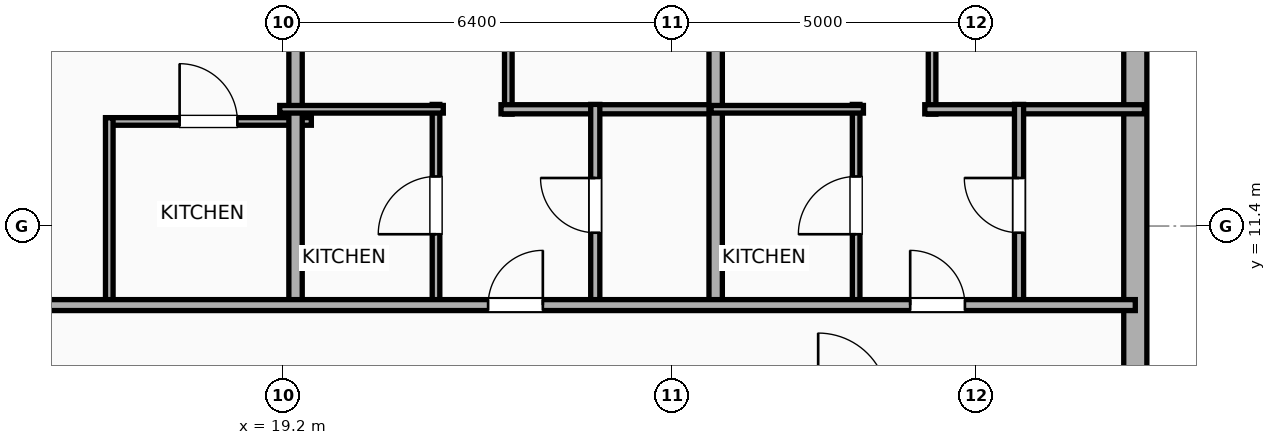
"""IFC4 building model, lengths in metres.
Left out: names, types, materials, properties, quantities, classifications, styles, units other than length and angle.
Written with IfcOpenShell. Run it as: python <this file> out.ifc"""

import sys

from ifc_helpers import new_model, si_unit, direction, frame, frame_2d, origin, place, context, subcontext, project, spatial, rectangle, extrude, element, fill, save


model = new_model("IFC4")
c1 = context("Model", 3, precision=1e-05, world=origin(), true_north=direction((0.0, 1.0)))
c2 = subcontext(c1, "Body", "Model", "MODEL_VIEW")
j1 = project(units=[si_unit("LENGTHUNIT", "METRE"), si_unit("PLANEANGLEUNIT", "RADIAN")], contexts=[c1])
p1 = place(None, origin())
s1 = spatial("IfcSite", under=j1, at=p1, CompositionType="ELEMENT")
p2 = place(p1, origin())
s2 = spatial("IfcBuilding", under=s1, at=p2, CompositionType="ELEMENT")
p3 = place(p2, frame((0.0, 0.0, 97.5)))
s3 = spatial("IfcBuildingStorey", under=s2, at=p3, CompositionType="ELEMENT", Elevation=97.5)
p4 = place(p3, frame((33.21, 17.781, 0.0), z_axis=(0.0, 0.0, 1.0), x_axis=(0.0, -1.0, 0.0)))
e1 = element("IfcWall", 1, at=p4, inside=s3, PredefinedType="ELEMENTEDWALL", context=c2, shape_type="SweptSolid", body=[
    extrude(rectangle(XDim=34.363, YDim=0.38, at=frame_2d((17.181, 0.0))), origin(), (0.0, 0.0, 1.0), 3.65),
])
p5 = place(p4, frame((12.836, 0.0, 0.75)))
e2 = element("IfcOpeningElement", 2, at=p5, cuts=e1, PredefinedType="OPENING", context=c2, shape_type="SweptSolid", body=[
    extrude(rectangle(XDim=1.2, YDim=2.05, at=frame_2d((0.6, 1.025))), frame((0.0, 0.2, 0.0), z_axis=(0.0, -1.0, 0.0), x_axis=(1.0, 0.0, 0.0)), (0.0, 0.0, 1.0), 0.4),
])
p6 = place(p4, frame((21.386, 0.0, 0.75)))
e3 = element("IfcOpeningElement", 3, at=p6, cuts=e1, PredefinedType="OPENING", context=c2, shape_type="SweptSolid", body=[
    extrude(rectangle(XDim=1.2, YDim=2.05, at=frame_2d((0.6, 1.025))), frame((0.0, 0.2, 0.0), z_axis=(0.0, -1.0, 0.0), x_axis=(1.0, 0.0, 0.0)), (0.0, 0.0, 1.0), 0.4),
])
p7 = place(p3, frame((16.277, 13.12, 0.0), z_axis=(0.0, 0.0, 1.0), x_axis=(1.0, 0.0, 0.0)))
e4 = element("IfcWall", 4, at=p7, inside=s3, PredefinedType="PARTITIONING", context=c2, shape_type="SweptSolid", body=[
    extrude(rectangle(XDim=3.383, YDim=0.125, at=frame_2d((1.691, 0.0))), origin(), (0.0, 0.0, 1.0), 3.65),
])
p8 = place(p7, frame((1.217, 0.0, 0.0)))
e5 = element("IfcOpeningElement", 5, at=p8, cuts=e4, PredefinedType="OPENING", context=c2, shape_type="SweptSolid", body=[
    extrude(rectangle(XDim=0.95, YDim=2.05, at=frame_2d((0.475, 1.025))), frame((0.0, 0.073, 0.0), z_axis=(0.0, -1.0, 0.0), x_axis=(1.0, 0.0, 0.0)), (0.0, 0.0, 1.0), 0.145),
])
p9 = place(p3, frame((16.337, 10.08, 0.0), z_axis=(0.0, 0.0, 1.0), x_axis=(0.0, 1.0, 0.0)))
e6 = element("IfcWall", 6, at=p9, inside=s3, PredefinedType="PARTITIONING", context=c2, shape_type="SweptSolid", body=[
    extrude(rectangle(XDim=3.1, YDim=0.125, at=frame_2d((1.55, 0.0))), origin(), (0.0, 0.0, 1.0), 3.65),
])
p10 = place(p3, frame((19.4, 10.02, 0.0), z_axis=(0.0, 0.0, 1.0), x_axis=(0.0, 1.0, 0.0)))
e7 = element("IfcWall", 7, at=p10, inside=s3, PredefinedType="PARTITIONING", context=c2, shape_type="SweptSolid", body=[
    extrude(rectangle(XDim=11.59, YDim=0.22, at=frame_2d((5.795, 0.0))), origin(), (0.0, 0.0, 1.0), 3.65),
])
p11 = place(p3, frame((22.899, 13.24, 0.0), z_axis=(0.0, 0.0, 1.0), x_axis=(0.0, 1.0, 0.0)))
e8 = element("IfcWall", 8, at=p11, inside=s3, PredefinedType="PARTITIONING", context=c2, shape_type="SweptSolid", body=[
    extrude(rectangle(XDim=8.52, YDim=0.125, at=frame_2d((4.26, 0.0))), origin(), (0.0, 0.0, 1.0), 3.65),
])
p12 = place(p11, frame((1.595, 0.0, 0.0)))
e9 = element("IfcOpeningElement", 9, at=p12, cuts=e8, PredefinedType="OPENING", context=c2, shape_type="SweptSolid", body=[
    extrude(rectangle(XDim=0.9, YDim=2.05, at=frame_2d((0.45, 1.025))), frame((0.0, 0.073, 0.0), z_axis=(0.0, -1.0, 0.0), x_axis=(1.0, 0.0, 0.0)), (0.0, 0.0, 1.0), 0.145),
])
p13 = place(p3, frame((22.779, 13.32, 0.0), z_axis=(0.0, 0.0, 1.0), x_axis=(1.0, 0.0, 0.0)))
e10 = element("IfcWall", 10, at=p13, inside=s3, PredefinedType="PLUMBINGWALL", context=c2, shape_type="SweptSolid", body=[
    extrude(rectangle(XDim=3.605, YDim=0.15, at=frame_2d((1.802, 0.0))), origin(), (0.0, 0.0, 1.0), 3.65),
])
p14 = place(p3, frame((21.71, 10.08, 0.0), z_axis=(0.0, 0.0, 1.0), x_axis=(0.0, 1.0, 0.0)))
e11 = element("IfcWall", 11, at=p14, inside=s3, PredefinedType="PARTITIONING", context=c2, shape_type="SweptSolid", body=[
    extrude(rectangle(XDim=3.32, YDim=0.125, at=frame_2d((1.66, 0.0))), origin(), (0.0, 0.0, 1.0), 3.65),
])
p15 = place(p14, frame((1.185, 0.0, 0.0)))
e12 = element("IfcOpeningElement", 12, at=p15, cuts=e11, PredefinedType="OPENING", context=c2, shape_type="SweptSolid", body=[
    extrude(rectangle(XDim=0.95, YDim=2.05, at=frame_2d((0.475, 1.025))), frame((0.0, 0.073, 0.0), z_axis=(0.0, -1.0, 0.0), x_axis=(1.0, 0.0, 0.0)), (0.0, 0.0, 1.0), 0.145),
])
p16 = place(p3, frame((19.14, 13.32, 0.0), z_axis=(0.0, 0.0, 1.0), x_axis=(1.0, 0.0, 0.0)))
e13 = element("IfcWall", 13, at=p16, inside=s3, PredefinedType="PARTITIONING", context=c2, shape_type="SweptSolid", body=[
    extrude(rectangle(XDim=2.69, YDim=0.125, at=frame_2d((1.345, 0.0))), origin(), (0.0, 0.0, 1.0), 3.65),
])
p17 = place(p3, frame((24.329, 10.08, 0.0), z_axis=(0.0, 0.0, 1.0), x_axis=(0.0, 1.0, 0.0)))
e14 = element("IfcWall", 14, at=p17, inside=s3, PredefinedType="PLUMBINGWALL", context=c2, shape_type="SweptSolid", body=[
    extrude(rectangle(XDim=3.32, YDim=0.15, at=frame_2d((1.66, 0.0))), origin(), (0.0, 0.0, 1.0), 3.65),
])
p18 = place(p17, frame((1.21, 0.0, 0.0)))
e15 = element("IfcOpeningElement", 15, at=p18, cuts=e14, PredefinedType="OPENING", context=c2, shape_type="SweptSolid", body=[
    extrude(rectangle(XDim=0.9, YDim=2.05, at=frame_2d((0.45, 1.025))), frame((0.0, 0.085, 0.0), z_axis=(0.0, -1.0, 0.0), x_axis=(1.0, 0.0, 0.0)), (0.0, 0.0, 1.0), 0.17),
])
p19 = place(p3, frame((26.309, 10.02, 0.0), z_axis=(0.0, 0.0, 1.0), x_axis=(0.0, 1.0, 0.0)))
e16 = element("IfcWall", 16, at=p19, inside=s3, PredefinedType="PARTITIONING", context=c2, shape_type="SweptSolid", body=[
    extrude(rectangle(XDim=11.59, YDim=0.22, at=frame_2d((5.795, 0.0))), origin(), (0.0, 0.0, 1.0), 3.65),
])
p20 = place(p3, frame((29.868, 13.24, 0.0), z_axis=(0.0, 0.0, 1.0), x_axis=(0.0, 1.0, 0.0)))
e17 = element("IfcWall", 17, at=p20, inside=s3, PredefinedType="PARTITIONING", context=c2, shape_type="SweptSolid", body=[
    extrude(rectangle(XDim=8.426, YDim=0.125, at=frame_2d((4.213, 0.0))), origin(), (0.0, 0.0, 1.0), 3.65),
])
p21 = place(p20, frame((1.572, 0.0, 0.0)))
e18 = element("IfcOpeningElement", 18, at=p21, cuts=e17, PredefinedType="OPENING", context=c2, shape_type="SweptSolid", body=[
    extrude(rectangle(XDim=0.9, YDim=2.05, at=frame_2d((0.45, 1.025))), frame((0.0, 0.073, 0.0), z_axis=(0.0, -1.0, 0.0), x_axis=(1.0, 0.0, 0.0)), (0.0, 0.0, 1.0), 0.145),
])
p22 = place(p3, frame((29.748, 13.32, 0.0), z_axis=(0.0, 0.0, 1.0), x_axis=(1.0, 0.0, 0.0)))
e19 = element("IfcWall", 19, at=p22, inside=s3, PredefinedType="PLUMBINGWALL", context=c2, shape_type="SweptSolid", body=[
    extrude(rectangle(XDim=3.612, YDim=0.15, at=frame_2d((1.806, 0.0))), origin(), (0.0, 0.0, 1.0), 3.65),
])
p23 = place(p3, frame((28.619, 10.08, 0.0), z_axis=(0.0, 0.0, 1.0), x_axis=(0.0, 1.0, 0.0)))
e20 = element("IfcWall", 20, at=p23, inside=s3, PredefinedType="PARTITIONING", context=c2, shape_type="SweptSolid", body=[
    extrude(rectangle(XDim=3.32, YDim=0.125, at=frame_2d((1.66, 0.0))), origin(), (0.0, 0.0, 1.0), 3.65),
])
p24 = place(p23, frame((1.185, 0.0, 0.0)))
e21 = element("IfcOpeningElement", 21, at=p24, cuts=e20, PredefinedType="OPENING", context=c2, shape_type="SweptSolid", body=[
    extrude(rectangle(XDim=0.95, YDim=2.05, at=frame_2d((0.475, 1.025))), frame((0.0, 0.073, 0.0), z_axis=(0.0, -1.0, 0.0), x_axis=(1.0, 0.0, 0.0)), (0.0, 0.0, 1.0), 0.145),
])
p25 = place(p3, frame((26.234, 13.32, 0.0), z_axis=(0.0, 0.0, 1.0), x_axis=(1.0, 0.0, 0.0)))
e22 = element("IfcWall", 22, at=p25, inside=s3, PredefinedType="PARTITIONING", context=c2, shape_type="SweptSolid", body=[
    extrude(rectangle(XDim=2.505, YDim=0.125, at=frame_2d((1.252, 0.0))), origin(), (0.0, 0.0, 1.0), 3.65),
])
p26 = place(p3, frame((31.298, 10.08, 0.0), z_axis=(0.0, 0.0, 1.0), x_axis=(0.0, 1.0, 0.0)))
e23 = element("IfcWall", 23, at=p26, inside=s3, PredefinedType="PLUMBINGWALL", context=c2, shape_type="SweptSolid", body=[
    extrude(rectangle(XDim=3.32, YDim=0.15, at=frame_2d((1.66, 0.0))), origin(), (0.0, 0.0, 1.0), 3.65),
])
p27 = place(p26, frame((1.21, 0.0, 0.0)))
e24 = element("IfcOpeningElement", 24, at=p27, cuts=e23, PredefinedType="OPENING", context=c2, shape_type="SweptSolid", body=[
    extrude(rectangle(XDim=0.9, YDim=2.05, at=frame_2d((0.45, 1.025))), frame((0.0, 0.085, 0.0), z_axis=(0.0, -1.0, 0.0), x_axis=(1.0, 0.0, 0.0)), (0.0, 0.0, 1.0), 0.17),
])
p28 = place(p3, frame((-29.21, 10.1, 0.0), z_axis=(0.0, 0.0, 1.0), x_axis=(1.0, 0.0, 0.0)))
e25 = element("IfcWall", 25, at=p28, inside=s3, PredefinedType="PARTITIONING", context=c2, shape_type="SweptSolid", body=[
    extrude(rectangle(XDim=62.42, YDim=0.18, at=frame_2d((31.21, 0.0))), origin(), (0.0, 0.0, 1.0), 3.65),
])
p29 = place(p28, frame((4.906, 0.0, 0.0)))
e26 = element("IfcOpeningElement", 26, at=p29, cuts=e25, PredefinedType="OPENING", context=c2, shape_type="SweptSolid", body=[
    extrude(rectangle(XDim=1.15, YDim=2.05, at=frame_2d((0.575, 1.025))), frame((0.0, 0.1, 0.0), z_axis=(0.0, -1.0, 0.0), x_axis=(1.0, 0.0, 0.0)), (0.0, 0.0, 1.0), 0.2),
])
p30 = place(p28, frame((14.812, 0.0, 0.0)))
e27 = element("IfcOpeningElement", 27, at=p30, cuts=e25, PredefinedType="OPENING", context=c2, shape_type="SweptSolid", body=[
    extrude(rectangle(XDim=1.15, YDim=2.05, at=frame_2d((0.575, 1.025))), frame((0.0, 0.1, 0.0), z_axis=(0.0, -1.0, 0.0), x_axis=(1.0, 0.0, 0.0)), (0.0, 0.0, 1.0), 0.2),
])
p31 = place(p28, frame((24.406, 0.0, 0.0)))
e28 = element("IfcOpeningElement", 28, at=p31, cuts=e25, PredefinedType="OPENING", context=c2, shape_type="SweptSolid", body=[
    extrude(rectangle(XDim=1.15, YDim=2.05, at=frame_2d((0.575, 1.025))), frame((0.0, 0.1, 0.0), z_axis=(0.0, -1.0, 0.0), x_axis=(1.0, 0.0, 0.0)), (0.0, 0.0, 1.0), 0.2),
])
p32 = place(p28, frame((33.981, 0.0, 0.0)))
e29 = element("IfcOpeningElement", 29, at=p32, cuts=e25, PredefinedType="OPENING", context=c2, shape_type="SweptSolid", body=[
    extrude(rectangle(XDim=1.15, YDim=2.05, at=frame_2d((0.575, 1.025))), frame((0.0, 0.1, 0.0), z_axis=(0.0, -1.0, 0.0), x_axis=(1.0, 0.0, 0.0)), (0.0, 0.0, 1.0), 0.2),
])
p33 = place(p28, frame((43.138, 0.0, 0.0)))
e30 = element("IfcOpeningElement", 30, at=p33, cuts=e25, PredefinedType="OPENING", context=c2, shape_type="SweptSolid", body=[
    extrude(rectangle(XDim=1.15, YDim=2.05, at=frame_2d((0.575, 1.025))), frame((0.0, 0.1, 0.0), z_axis=(0.0, -1.0, 0.0), x_axis=(1.0, 0.0, 0.0)), (0.0, 0.0, 1.0), 0.2),
])
p34 = place(p28, frame((51.777, 0.0, 0.0)))
e31 = element("IfcOpeningElement", 31, at=p34, cuts=e25, PredefinedType="OPENING", context=c2, shape_type="SweptSolid", body=[
    extrude(rectangle(XDim=0.9, YDim=2.05, at=frame_2d((0.45, 1.025))), frame((0.0, 0.1, 0.0), z_axis=(0.0, -1.0, 0.0), x_axis=(1.0, 0.0, 0.0)), (0.0, 0.0, 1.0), 0.2),
])
p35 = place(p28, frame((58.718, 0.0, 0.0)))
e32 = element("IfcOpeningElement", 32, at=p35, cuts=e25, PredefinedType="OPENING", context=c2, shape_type="SweptSolid", body=[
    extrude(rectangle(XDim=0.9, YDim=2.05, at=frame_2d((0.45, 1.025))), frame((0.0, 0.1, 0.0), z_axis=(0.0, -1.0, 0.0), x_axis=(1.0, 0.0, 0.0)), (0.0, 0.0, 1.0), 0.2),
])
p36 = place(p8, origin())
e33 = element("IfcDoor", 33, at=p36, inside=s3, OperationType="SINGLE_SWING_LEFT", PredefinedType="DOOR", context=c2, shape_type="SweptSolid", body=[
    extrude(rectangle(XDim=0.95, YDim=2.05, at=frame_2d((0.475, 1.025))), frame((0.0, 0.025, 0.0), z_axis=(0.0, -1.0, 0.0), x_axis=(1.0, 0.0, 0.0)), (0.0, 0.0, 1.0), 0.05),
])
fill(e5, e33)
p37 = place(p15, origin())
e34 = element("IfcDoor", 34, at=p37, inside=s3, OperationType="SINGLE_SWING_LEFT", PredefinedType="DOOR", context=c2, shape_type="SweptSolid", body=[
    extrude(rectangle(XDim=0.95, YDim=2.05, at=frame_2d((0.475, 1.025))), frame((0.0, 0.025, 0.0), z_axis=(0.0, -1.0, 0.0), x_axis=(1.0, 0.0, 0.0)), (0.0, 0.0, 1.0), 0.05),
])
fill(e12, e34)
p38 = place(p18, origin())
e35 = element("IfcDoor", 35, at=p38, inside=s3, OperationType="SINGLE_SWING_RIGHT", PredefinedType="DOOR", context=c2, shape_type="SweptSolid", body=[
    extrude(rectangle(XDim=0.9, YDim=2.05, at=frame_2d((0.45, 1.025))), frame((0.0, 0.025, 0.0), z_axis=(0.0, -1.0, 0.0), x_axis=(1.0, 0.0, 0.0)), (0.0, 0.0, 1.0), 0.05),
])
fill(e15, e35)
p39 = place(p24, origin())
e36 = element("IfcDoor", 36, at=p39, inside=s3, OperationType="SINGLE_SWING_LEFT", PredefinedType="DOOR", context=c2, shape_type="SweptSolid", body=[
    extrude(rectangle(XDim=0.95, YDim=2.05, at=frame_2d((0.475, 1.025))), frame((0.0, 0.025, 0.0), z_axis=(0.0, -1.0, 0.0), x_axis=(1.0, 0.0, 0.0)), (0.0, 0.0, 1.0), 0.05),
])
fill(e21, e36)
p40 = place(p27, origin())
e37 = element("IfcDoor", 37, at=p40, inside=s3, OperationType="SINGLE_SWING_RIGHT", PredefinedType="DOOR", context=c2, shape_type="SweptSolid", body=[
    extrude(rectangle(XDim=0.9, YDim=2.05, at=frame_2d((0.45, 1.025))), frame((0.0, 0.025, 0.0), z_axis=(0.0, -1.0, 0.0), x_axis=(1.0, 0.0, 0.0)), (0.0, 0.0, 1.0), 0.05),
])
fill(e24, e37)
p41 = place(p34, origin())
e38 = element("IfcDoor", 38, at=p41, inside=s3, OperationType="SINGLE_SWING_RIGHT", PredefinedType="DOOR", context=c2, shape_type="SweptSolid", body=[
    extrude(rectangle(XDim=0.9, YDim=2.05, at=frame_2d((0.45, 1.025))), frame((0.0, 0.025, 0.0), z_axis=(0.0, -1.0, 0.0), x_axis=(1.0, 0.0, 0.0)), (0.0, 0.0, 1.0), 0.05),
])
fill(e31, e38)
p42 = place(p35, origin())
e39 = element("IfcDoor", 39, at=p42, inside=s3, OperationType="SINGLE_SWING_LEFT", PredefinedType="DOOR", context=c2, shape_type="SweptSolid", body=[
    extrude(rectangle(XDim=0.9, YDim=2.05, at=frame_2d((0.45, 1.025))), frame((0.0, 0.025, 0.0), z_axis=(0.0, -1.0, 0.0), x_axis=(1.0, 0.0, 0.0)), (0.0, 0.0, 1.0), 0.05),
])
fill(e32, e39)
save(model, sys.argv[1])
